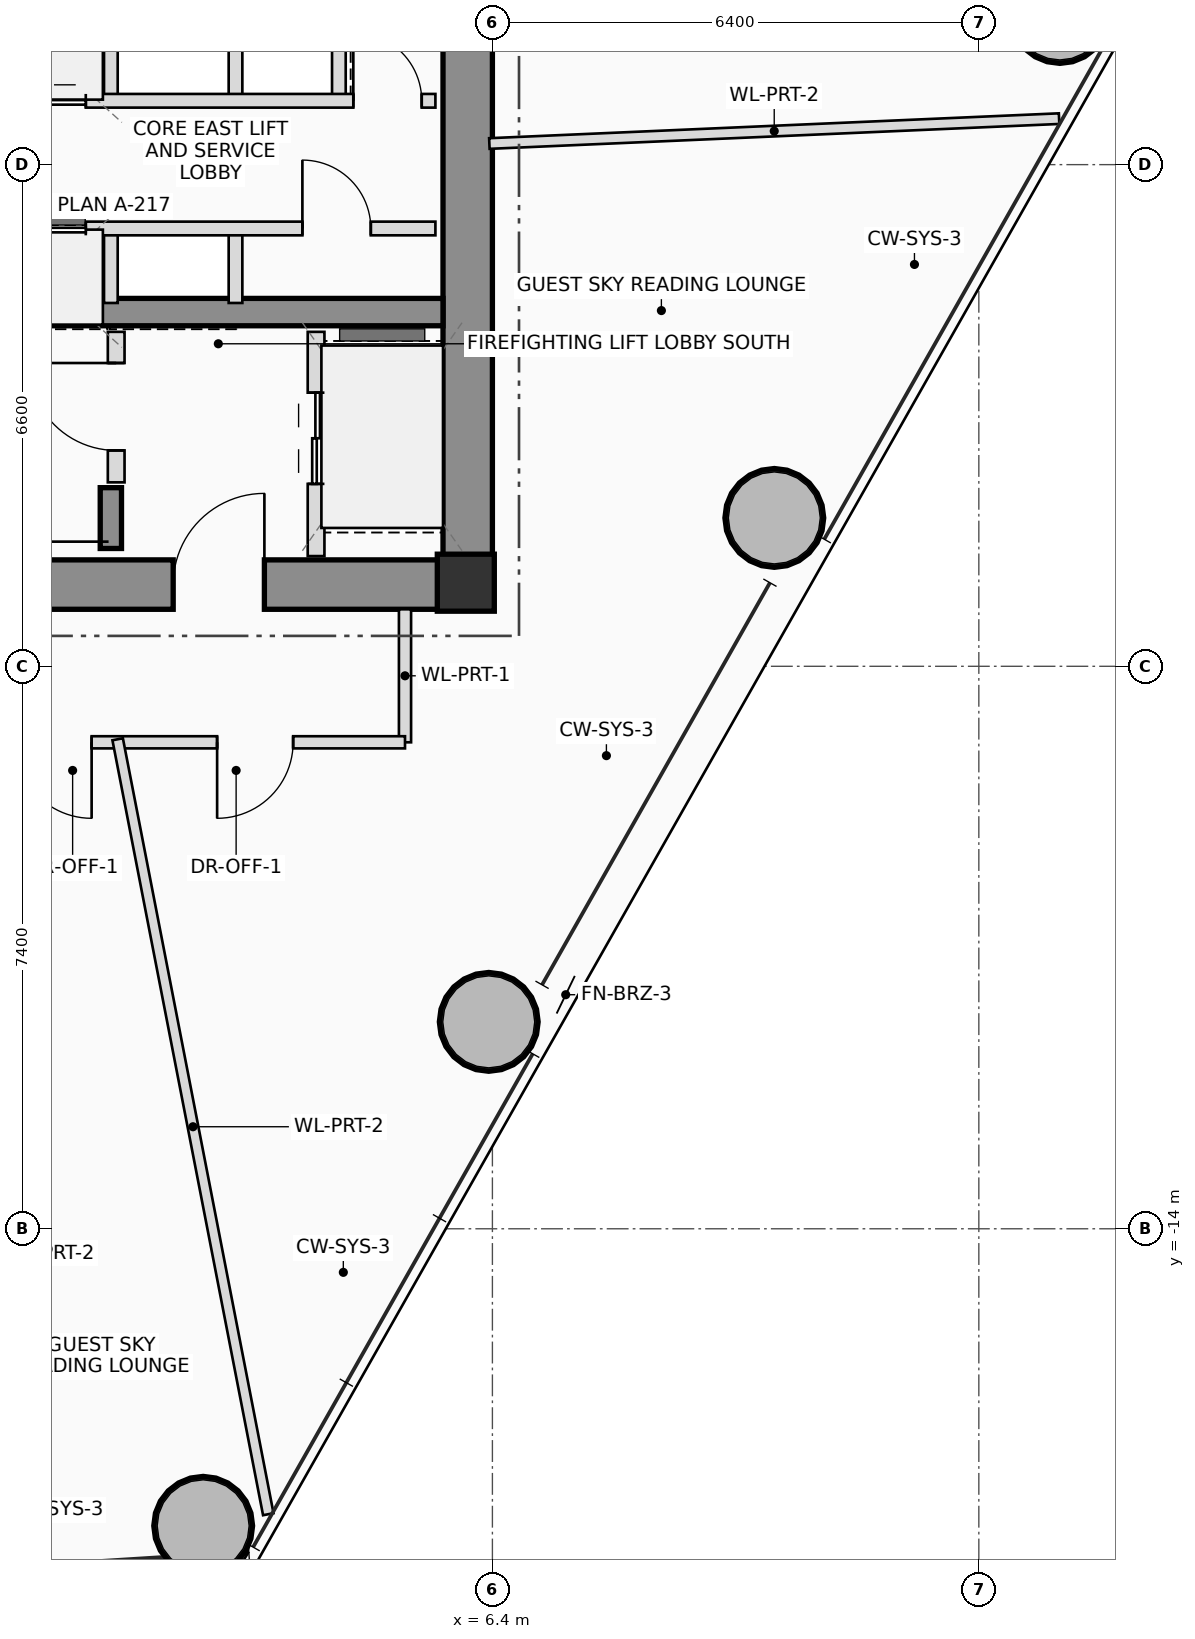
"""IFC4 building model, lengths in metres.
Left out: names, types, materials, properties, quantities, classifications, styles, units other than length and angle.
Written with IfcOpenShell. Run it as: python <this file> out.ifc"""

import sys

from ifc_helpers import new_model, si_unit, direction, frame, frame_2d, origin, origin_2d, place, context, subcontext, project, spatial, rectangle, hollow_circle, extrude, source, transform, mapped, element, fill, save


model = new_model("IFC4")
c1 = context("Model", 3, precision=1e-05, world=origin(), true_north=direction((0.0, 1.0)))
c2 = subcontext(c1, "Body", "Model", "MODEL_VIEW")
j1 = project(units=[si_unit("LENGTHUNIT", "METRE"), si_unit("PLANEANGLEUNIT", "RADIAN")], contexts=[c1])
p1 = place(None, origin())
s1 = spatial("IfcSite", under=j1, at=p1, CompositionType="ELEMENT")
p2 = place(p1, origin())
s2 = spatial("IfcBuilding", under=s1, at=p2, CompositionType="ELEMENT")
p3 = place(p2, frame((0.0, 0.0, 182.9)))
s3 = spatial("IfcBuildingStorey", under=s2, at=p3, CompositionType="ELEMENT", Elevation=182.9)
m1 = source(origin(), c2, "Body", "SweptSolid", [
    extrude(rectangle(XDim=0.75, YDim=0.75, at=origin_2d()), origin(), (0.0, 0.0, 1.0), 3.45),
])
p4 = place(p3, frame((6.05, -5.5, 0.0), z_axis=(0.0, 0.0, 1.0), x_axis=(1.0, 0.0, 0.0)))
e1 = element("IfcColumn", 1, at=p4, inside=s3, PredefinedType="COLUMN", context=c2, shape_type="MappedRepresentation", body=[
    mapped(m1, transform((0.0, 0.0, 0.0), scale=1.0)),
])
p5 = place(p3, frame((-6.4, -5.525, 0.0), z_axis=(0.0, 0.0, 1.0), x_axis=(1.0, 0.0, 0.0)))
e2 = element("IfcWall", 2, at=p5, inside=s3, PredefinedType="SHEAR", context=c2, shape_type="SweptSolid", body=[
    extrude(rectangle(XDim=12.8, YDim=0.65, at=frame_2d((6.4, 0.0))), origin(), (0.0, 0.0, 1.0), 3.45),
])
p6 = place(p5, frame((8.6, 0.0, 0.0)))
e3 = element("IfcOpeningElement", 3, at=p6, cuts=e2, PredefinedType="OPENING", context=c2, shape_type="SweptSolid", body=[
    extrude(rectangle(XDim=1.2, YDim=2.2, at=frame_2d((0.6, 1.1))), frame((0.0, 0.335, 0.0), z_axis=(0.0, -1.0, 0.0), x_axis=(1.0, 0.0, 0.0)), (0.0, 0.0, 1.0), 0.67),
])
p7 = place(p3, frame((6.075, -5.2, 0.0), z_axis=(0.0, 0.0, 1.0), x_axis=(0.0, 1.0, 0.0)))
e4 = element("IfcWall", 4, at=p7, inside=s3, PredefinedType="SHEAR", context=c2, shape_type="SweptSolid", body=[
    extrude(rectangle(XDim=10.4, YDim=0.65, at=frame_2d((5.2, 0.0))), origin(), (0.0, 0.0, 1.0), 3.45),
])
p8 = place(p3, frame((-5.75, -1.94, 0.0), z_axis=(0.0, 0.0, 1.0), x_axis=(1.0, 0.0, 0.0)))
e5 = element("IfcWall", 5, at=p8, inside=s3, PredefinedType="SHEAR", context=c2, shape_type="SweptSolid", body=[
    extrude(rectangle(XDim=11.5, YDim=0.36, at=frame_2d((5.75, 0.0))), origin(), (0.0, 0.0, 1.0), 3.45),
])
p9 = place(p3, frame((1.38, -5.05, 0.0), z_axis=(0.0, 0.0, 1.0), x_axis=(0.0, 1.0, 0.0)))
e6 = element("IfcWall", 6, at=p9, inside=s3, PredefinedType="SHEAR", context=c2, shape_type="SweptSolid", body=[
    extrude(rectangle(XDim=0.8, YDim=0.28, at=frame_2d((0.4, 0.0))), origin(), (0.0, 0.0, 1.0), 3.45),
])
m2 = source(origin(), c2, "Body", "SweptSolid", [
    extrude(hollow_circle(Radius=0.65, WallThickness=0.045, at=origin_2d()), origin(), (0.0, 0.0, 1.0), 3.45),
])
for number, where, z_axis, x_axis in (
    (7, (2.595, -17.908, 0.0), (0.0, 0.0, 1.0), (1.0, 0.0, 0.0)),
    (8, (6.352, -11.278, 0.0), (0.0, 0.0, 1.0), (1.0, 0.0, 0.0)),
    (9, (10.109, -4.648, 0.0), (0.0, 0.0, 1.0), (1.0, 0.0, 0.0)),
    (10, (13.866, 1.982, 0.0), (0.0, 0.0, 1.0), (1.0, 0.0, 0.0)),
):
    element("IfcColumn", number, at=place(p3, frame(where, z_axis=z_axis, x_axis=x_axis)), inside=s3, PredefinedType="COLUMN", context=c2, shape_type="MappedRepresentation", body=[
        mapped(m2, transform((0.0, 0.0, 0.0), scale=1.0)),
    ])
p10 = place(p3, frame((1.45, -4.18, 0.0), z_axis=(0.0, 0.0, 1.0), x_axis=(0.0, 1.0, 0.0)))
e11 = element("IfcWall", 11, at=p10, inside=s3, PredefinedType="PLUMBINGWALL", context=c2, shape_type="SweptSolid", body=[
    extrude(rectangle(XDim=1.98, YDim=0.22, at=frame_2d((0.99, 0.0))), origin(), (0.0, 0.0, 1.0), 3.21),
])
p11 = place(p10, frame((0.42, 0.0, 0.0)))
e12 = element("IfcOpeningElement", 12, at=p11, cuts=e11, PredefinedType="OPENING", context=c2, shape_type="SweptSolid", body=[
    extrude(rectangle(XDim=1.15, YDim=2.15, at=frame_2d((0.575, 1.075))), frame((0.0, 0.12, 0.0), z_axis=(0.0, -1.0, 0.0), x_axis=(1.0, 0.0, 0.0)), (0.0, 0.0, 1.0), 0.24),
])
p12 = place(p3, frame((4.08, -5.15, 0.0), z_axis=(0.0, 0.0, 1.0), x_axis=(0.0, 1.0, 0.0)))
e13 = element("IfcWall", 13, at=p12, inside=s3, PredefinedType="PLUMBINGWALL", context=c2, shape_type="SweptSolid", body=[
    extrude(rectangle(XDim=2.95, YDim=0.22, at=frame_2d((1.475, 0.0))), origin(), (0.0, 0.0, 1.0), 3.21),
])
p13 = place(p12, frame((0.95, 0.0, 0.0)))
e14 = element("IfcOpeningElement", 14, at=p13, cuts=e13, PredefinedType="OPENING", context=c2, shape_type="SweptSolid", body=[
    extrude(rectangle(XDim=1.2, YDim=2.25, at=frame_2d((0.6, 1.125))), frame((0.0, 0.12, 0.0), z_axis=(0.0, -1.0, 0.0), x_axis=(1.0, 0.0, 0.0)), (0.0, 0.0, 1.0), 0.24),
])
for number, where, z_axis, x_axis in (
    (15, (1.38, 0.84, 0.0), (0.0, 0.0, 1.0), (0.0, 1.0, 0.0)),
    (16, (1.38, -1.82, 0.0), (0.0, 0.0, 1.0), (0.0, 1.0, 0.0)),
    (17, (3.02, 0.84, 0.0), (0.0, 0.0, 1.0), (0.0, 1.0, 0.0)),
    (18, (4.38, 0.84, 0.0), (0.0, 0.0, 1.0), (0.0, 1.0, 0.0)),
    (19, (3.02, -1.82, 0.0), (0.0, 0.0, 1.0), (0.0, 1.0, 0.0)),
):
    element("IfcWall", number, at=place(p3, frame(where, z_axis=z_axis, x_axis=x_axis)), inside=s3, PredefinedType="PLUMBINGWALL", context=c2, shape_type="SweptSolid", body=[
        extrude(rectangle(XDim=0.98, YDim=0.18, at=frame_2d((0.49, 0.0))), origin(), (0.0, 0.0, 1.0), 3.21),
    ])
p14 = place(p3, frame((-5.68, 0.84, 0.0), z_axis=(0.0, 0.0, 1.0), x_axis=(1.0, 0.0, 0.0)))
e20 = element("IfcWall", 20, at=p14, inside=s3, PredefinedType="PLUMBINGWALL", context=c2, shape_type="SweptSolid", body=[
    extrude(rectangle(XDim=11.33, YDim=0.18, at=frame_2d((5.665, 0.0))), origin(), (0.0, 0.0, 1.0), 3.21),
])
p15 = place(p14, frame((1.03, 0.0, 0.0)))
e21 = element("IfcOpeningElement", 21, at=p15, cuts=e20, PredefinedType="OPENING", context=c2, shape_type="SweptSolid", body=[
    extrude(rectangle(XDim=0.9, YDim=2.05, at=frame_2d((0.45, 1.025))), frame((0.0, 0.1, 0.0), z_axis=(0.0, -1.0, 0.0), x_axis=(1.0, 0.0, 0.0)), (0.0, 0.0, 1.0), 0.2),
])
p16 = place(p14, frame((3.93, 0.0, 0.0)))
e22 = element("IfcOpeningElement", 22, at=p16, cuts=e20, PredefinedType="OPENING", context=c2, shape_type="SweptSolid", body=[
    extrude(rectangle(XDim=1.1, YDim=2.2, at=frame_2d((0.55, 1.1))), frame((0.0, 0.1, 0.0), z_axis=(0.0, -1.0, 0.0), x_axis=(1.0, 0.0, 0.0)), (0.0, 0.0, 1.0), 0.2),
])
p17 = place(p14, frame((5.63, 0.0, 0.0)))
e23 = element("IfcOpeningElement", 23, at=p17, cuts=e20, PredefinedType="OPENING", context=c2, shape_type="SweptSolid", body=[
    extrude(rectangle(XDim=1.1, YDim=2.2, at=frame_2d((0.55, 1.1))), frame((0.0, 0.1, 0.0), z_axis=(0.0, -1.0, 0.0), x_axis=(1.0, 0.0, 0.0)), (0.0, 0.0, 1.0), 0.2),
])
p18 = place(p14, frame((10.25, 0.0, 0.0)))
e24 = element("IfcOpeningElement", 24, at=p18, cuts=e20, PredefinedType="OPENING", context=c2, shape_type="SweptSolid", body=[
    extrude(rectangle(XDim=0.9, YDim=2.05, at=frame_2d((0.45, 1.025))), frame((0.0, 0.1, 0.0), z_axis=(0.0, -1.0, 0.0), x_axis=(1.0, 0.0, 0.0)), (0.0, 0.0, 1.0), 0.2),
])
p19 = place(p3, frame((-5.68, -0.84, 0.0), z_axis=(0.0, 0.0, 1.0), x_axis=(1.0, 0.0, 0.0)))
e25 = element("IfcWall", 25, at=p19, inside=s3, PredefinedType="PLUMBINGWALL", context=c2, shape_type="SweptSolid", body=[
    extrude(rectangle(XDim=11.33, YDim=0.18, at=frame_2d((5.665, 0.0))), origin(), (0.0, 0.0, 1.0), 3.21),
])
p20 = place(p19, frame((1.73, 0.0, 0.0)))
e26 = element("IfcOpeningElement", 26, at=p20, cuts=e25, PredefinedType="OPENING", context=c2, shape_type="SweptSolid", body=[
    extrude(rectangle(XDim=0.9, YDim=2.05, at=frame_2d((0.45, 1.025))), frame((0.0, 0.1, 0.0), z_axis=(0.0, -1.0, 0.0), x_axis=(1.0, 0.0, 0.0)), (0.0, 0.0, 1.0), 0.2),
])
p21 = place(p19, frame((3.93, 0.0, 0.0)))
e27 = element("IfcOpeningElement", 27, at=p21, cuts=e25, PredefinedType="OPENING", context=c2, shape_type="SweptSolid", body=[
    extrude(rectangle(XDim=1.1, YDim=2.2, at=frame_2d((0.55, 1.1))), frame((0.0, 0.1, 0.0), z_axis=(0.0, -1.0, 0.0), x_axis=(1.0, 0.0, 0.0)), (0.0, 0.0, 1.0), 0.2),
])
p22 = place(p19, frame((5.63, 0.0, 0.0)))
e28 = element("IfcOpeningElement", 28, at=p22, cuts=e25, PredefinedType="OPENING", context=c2, shape_type="SweptSolid", body=[
    extrude(rectangle(XDim=1.1, YDim=2.2, at=frame_2d((0.55, 1.1))), frame((0.0, 0.1, 0.0), z_axis=(0.0, -1.0, 0.0), x_axis=(1.0, 0.0, 0.0)), (0.0, 0.0, 1.0), 0.2),
])
p23 = place(p19, frame((9.58, 0.0, 0.0)))
e29 = element("IfcOpeningElement", 29, at=p23, cuts=e25, PredefinedType="OPENING", context=c2, shape_type="SweptSolid", body=[
    extrude(rectangle(XDim=0.9, YDim=2.05, at=frame_2d((0.45, 1.025))), frame((0.0, 0.1, 0.0), z_axis=(0.0, -1.0, 0.0), x_axis=(1.0, 0.0, 0.0)), (0.0, 0.0, 1.0), 0.2),
])
p24 = place(p3, frame((5.25, -5.85, 0.0), z_axis=(0.0, 0.0, 1.0), x_axis=(0.0, -1.0, 0.0)))
e30 = element("IfcWall", 30, at=p24, inside=s3, PredefinedType="PARTITIONING", context=c2, shape_type="SweptSolid", body=[
    extrude(rectangle(XDim=1.75, YDim=0.16, at=frame_2d((0.875, 0.0))), origin(), (0.0, 0.0, 1.0), 3.21),
])
p25 = place(p3, frame((5.25, -7.6, 0.0), z_axis=(0.0, 0.0, 1.0), x_axis=(-1.0, 0.0, 0.0)))
e31 = element("IfcWall", 31, at=p25, inside=s3, PredefinedType="PARTITIONING", context=c2, shape_type="SweptSolid", body=[
    extrude(rectangle(XDim=11.61, YDim=0.16, at=frame_2d((5.805, 0.0))), origin(), (0.0, 0.0, 1.0), 2.565),
])
p26 = place(p25, frame((1.472, 0.0, 0.0)))
e32 = element("IfcOpeningElement", 32, at=p26, cuts=e31, PredefinedType="OPENING", context=c2, shape_type="SweptSolid", body=[
    extrude(rectangle(XDim=1.0, YDim=2.25, at=frame_2d((0.5, 1.125))), frame((0.0, 0.09, 0.0), z_axis=(0.0, -1.0, 0.0), x_axis=(1.0, 0.0, 0.0)), (0.0, 0.0, 1.0), 0.18),
])
p27 = place(p25, frame((4.123, 0.0, 0.0)))
e33 = element("IfcOpeningElement", 33, at=p27, cuts=e31, PredefinedType="OPENING", context=c2, shape_type="SweptSolid", body=[
    extrude(rectangle(XDim=1.0, YDim=2.25, at=frame_2d((0.5, 1.125))), frame((0.0, 0.09, 0.0), z_axis=(0.0, -1.0, 0.0), x_axis=(1.0, 0.0, 0.0)), (0.0, 0.0, 1.0), 0.18),
])
p28 = place(p25, frame((7.589, 0.0, 0.0)))
e34 = element("IfcOpeningElement", 34, at=p28, cuts=e31, PredefinedType="OPENING", context=c2, shape_type="SweptSolid", body=[
    extrude(rectangle(XDim=1.05, YDim=2.2, at=frame_2d((0.525, 1.1))), frame((0.0, 0.09, 0.0), z_axis=(0.0, -1.0, 0.0), x_axis=(1.0, 0.0, 0.0)), (0.0, 0.0, 1.0), 0.18),
])
p29 = place(p3, frame((6.36, 0.278, 0.0), z_axis=(0.0, 0.0, 1.0), x_axis=(0.999047543566, 0.043634913719, 0.0)))
e35 = element("IfcWall", 35, at=p29, inside=s3, PredefinedType="PARTITIONING", context=c2, shape_type="SweptSolid", body=[
    extrude(rectangle(XDim=7.503, YDim=0.14, at=frame_2d((3.751, 0.0))), origin(), (0.0, 0.0, 1.0), 2.725),
])
p30 = place(p3, frame((1.469, -7.56, 0.0), z_axis=(0.0, 0.0, 1.0), x_axis=(0.190824358974, -0.981624196942, 0.0)))
e36 = element("IfcWall", 36, at=p30, inside=s3, PredefinedType="PARTITIONING", context=c2, shape_type="SweptSolid", body=[
    extrude(rectangle(XDim=10.386, YDim=0.14, at=frame_2d((5.193, 0.0))), origin(), (0.0, 0.0, 1.0), 2.565),
])
p31 = place(p6, origin())
e37 = element("IfcDoor", 37, at=p31, inside=s3, OperationType="SINGLE_SWING_RIGHT", PredefinedType="DOOR", context=c2, shape_type="SweptSolid", body=[
    extrude(rectangle(XDim=1.2, YDim=2.2, at=frame_2d((0.6, 1.1))), frame((0.0, 0.025, 0.0), z_axis=(0.0, -1.0, 0.0), x_axis=(1.0, 0.0, 0.0)), (0.0, 0.0, 1.0), 0.05),
])
fill(e3, e37)
p32 = place(p11, origin())
e38 = element("IfcDoor", 38, at=p32, inside=s3, OperationType="SINGLE_SWING_RIGHT", PredefinedType="DOOR", context=c2, shape_type="SweptSolid", body=[
    extrude(rectangle(XDim=1.15, YDim=2.15, at=frame_2d((0.575, 1.075))), frame((0.0, 0.025, 0.0), z_axis=(0.0, -1.0, 0.0), x_axis=(1.0, 0.0, 0.0)), (0.0, 0.0, 1.0), 0.05),
])
fill(e12, e38)
p33 = place(p13, origin())
e39 = element("IfcDoor", 39, at=p33, inside=s3, OperationType="DOUBLE_DOOR_SLIDING", PredefinedType="DOOR", context=c2, shape_type="SweptSolid", body=[
    extrude(rectangle(XDim=1.2, YDim=2.25, at=frame_2d((0.6, 1.125))), frame((0.0, 0.025, 0.0), z_axis=(0.0, -1.0, 0.0), x_axis=(1.0, 0.0, 0.0)), (0.0, 0.0, 1.0), 0.05),
])
fill(e14, e39)
p34 = place(p17, origin())
e40 = element("IfcDoor", 40, at=p34, inside=s3, OperationType="DOUBLE_DOOR_SLIDING", PredefinedType="DOOR", context=c2, shape_type="SweptSolid", body=[
    extrude(rectangle(XDim=1.1, YDim=2.2, at=frame_2d((0.55, 1.1))), frame((0.0, 0.025, 0.0), z_axis=(0.0, -1.0, 0.0), x_axis=(1.0, 0.0, 0.0)), (0.0, 0.0, 1.0), 0.05),
])
fill(e23, e40)
p35 = place(p18, origin())
e41 = element("IfcDoor", 41, at=p35, inside=s3, OperationType="SINGLE_SWING_LEFT", PredefinedType="DOOR", context=c2, shape_type="SweptSolid", body=[
    extrude(rectangle(XDim=0.9, YDim=2.05, at=frame_2d((0.45, 1.025))), frame((0.0, 0.025, 0.0), z_axis=(0.0, -1.0, 0.0), x_axis=(1.0, 0.0, 0.0)), (0.0, 0.0, 1.0), 0.05),
])
fill(e24, e41)
p36 = place(p22, origin())
e42 = element("IfcDoor", 42, at=p36, inside=s3, OperationType="DOUBLE_DOOR_SLIDING", PredefinedType="DOOR", context=c2, shape_type="SweptSolid", body=[
    extrude(rectangle(XDim=1.1, YDim=2.2, at=frame_2d((0.55, 1.1))), frame((0.0, 0.025, 0.0), z_axis=(0.0, -1.0, 0.0), x_axis=(1.0, 0.0, 0.0)), (0.0, 0.0, 1.0), 0.05),
])
fill(e28, e42)
p37 = place(p23, origin())
e43 = element("IfcDoor", 43, at=p37, inside=s3, OperationType="SINGLE_SWING_LEFT", PredefinedType="DOOR", context=c2, shape_type="SweptSolid", body=[
    extrude(rectangle(XDim=0.9, YDim=2.05, at=frame_2d((0.45, 1.025))), frame((0.0, 0.025, 0.0), z_axis=(0.0, -1.0, 0.0), x_axis=(1.0, 0.0, 0.0)), (0.0, 0.0, 1.0), 0.05),
])
fill(e29, e43)
p38 = place(p26, origin())
e44 = element("IfcDoor", 44, at=p38, inside=s3, OperationType="SINGLE_SWING_RIGHT", PredefinedType="DOOR", context=c2, shape_type="SweptSolid", body=[
    extrude(rectangle(XDim=1.0, YDim=2.25, at=frame_2d((0.5, 1.125))), frame((0.0, 0.025, 0.0), z_axis=(0.0, -1.0, 0.0), x_axis=(1.0, 0.0, 0.0)), (0.0, 0.0, 1.0), 0.05),
])
fill(e32, e44)
p39 = place(p27, origin())
e45 = element("IfcDoor", 45, at=p39, inside=s3, OperationType="SINGLE_SWING_LEFT", PredefinedType="DOOR", context=c2, shape_type="SweptSolid", body=[
    extrude(rectangle(XDim=1.0, YDim=2.25, at=frame_2d((0.5, 1.125))), frame((0.0, 0.025, 0.0), z_axis=(0.0, -1.0, 0.0), x_axis=(1.0, 0.0, 0.0)), (0.0, 0.0, 1.0), 0.05),
])
fill(e33, e45)
save(model, sys.argv[1])
